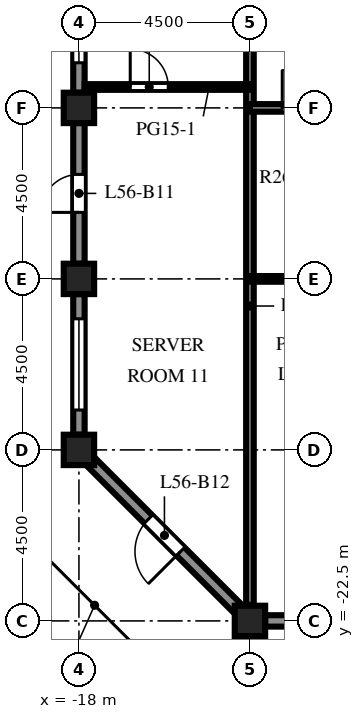
"""IFC4 building model, lengths in metres.
Left out: names, types, materials, properties, quantities, classifications, styles, units other than length and angle.
Written with IfcOpenShell. Run it as: python <this file> out.ifc"""

import sys

from ifc_helpers import new_model, si_unit, direction, frame, frame_2d, origin, origin_2d, place, context, subcontext, project, spatial, rectangle, extrude, element, fill, save


model = new_model("IFC4")
c1 = context("Model", 3, precision=1e-05, world=origin(), true_north=direction((0.0, 1.0)))
c2 = subcontext(c1, "Body", "Model", "MODEL_VIEW")
j1 = project(units=[si_unit("LENGTHUNIT", "METRE"), si_unit("PLANEANGLEUNIT", "RADIAN")], contexts=[c1])
p1 = place(None, origin())
s1 = spatial("IfcSite", under=j1, at=p1, CompositionType="ELEMENT")
p2 = place(p1, origin())
s2 = spatial("IfcBuilding", under=s1, at=p2, CompositionType="ELEMENT")
p3 = place(p2, frame((0.0, 0.0, 248.0)))
s3 = spatial("IfcBuildingStorey", under=s2, at=p3, CompositionType="ELEMENT", Elevation=248.0)
for number, where, z_axis, x_axis in (
    (1, (-18.0, -18.0, 0.0), (0.0, 0.0, 1.0), (1.0, 0.0, 0.0)),
    (2, (-18.0, -13.5, 0.0), (0.0, 0.0, 1.0), (1.0, 0.0, 0.0)),
    (3, (-18.0, -9.0, 0.0), (0.0, 0.0, 1.0), (1.0, 0.0, 0.0)),
    (4, (-13.5, -22.5, 0.0), (0.0, 0.0, 1.0), (1.0, 0.0, 0.0)),
):
    element("IfcColumn", number, at=place(p3, frame(where, z_axis=z_axis, x_axis=x_axis)), inside=s3, PredefinedType="COLUMN", context=c2, shape_type="SweptSolid", body=[
        extrude(rectangle(XDim=0.8, YDim=0.8, at=origin_2d()), origin(), (0.0, 0.0, 1.0), 4.1),
    ])
p4 = place(p3, frame((-9.4, -22.5, 0.0), z_axis=(0.0, 0.0, 1.0), x_axis=(-1.0, 0.0, 0.0)))
e5 = element("IfcWall", 5, at=p4, inside=s3, PredefinedType="SOLIDWALL", context=c2, shape_type="SweptSolid", body=[
    extrude(rectangle(XDim=3.7, YDim=0.3, at=frame_2d((1.85, 0.0))), origin(), (0.0, 0.0, 1.0), 2.85),
])
p5 = place(p4, frame((0.65, 0.0, 0.8)))
e6 = element("IfcOpeningElement", 6, at=p5, cuts=e5, PredefinedType="OPENING", context=c2, shape_type="SweptSolid", body=[
    extrude(rectangle(XDim=2.4, YDim=1.7, at=frame_2d((1.2, 0.85))), frame((0.0, 0.16, 0.0), z_axis=(0.0, -1.0, 0.0), x_axis=(1.0, 0.0, 0.0)), (0.0, 0.0, 1.0), 0.32),
])
p6 = place(p3, frame((-18.0, -8.6, 0.0), z_axis=(0.0, 0.0, 1.0), x_axis=(0.0, 1.0, 0.0)))
e7 = element("IfcWall", 7, at=p6, inside=s3, PredefinedType="SOLIDWALL", context=c2, shape_type="SweptSolid", body=[
    extrude(rectangle(XDim=3.7, YDim=0.3, at=frame_2d((1.85, 0.0))), origin(), (0.0, 0.0, 1.0), 2.85),
])
p7 = place(p6, frame((0.788, 0.0, 0.8)))
e8 = element("IfcOpeningElement", 8, at=p7, cuts=e7, PredefinedType="OPENING", context=c2, shape_type="SweptSolid", body=[
    extrude(rectangle(XDim=2.4, YDim=1.7, at=frame_2d((1.2, 0.85))), frame((0.0, 0.16, 0.0), z_axis=(0.0, -1.0, 0.0), x_axis=(1.0, 0.0, 0.0)), (0.0, 0.0, 1.0), 0.32),
])
p8 = place(p3, frame((-18.0, -13.1, 0.0), z_axis=(0.0, 0.0, 1.0), x_axis=(0.0, 1.0, 0.0)))
e9 = element("IfcWall", 9, at=p8, inside=s3, PredefinedType="SOLIDWALL", context=c2, shape_type="SweptSolid", body=[
    extrude(rectangle(XDim=3.7, YDim=0.3, at=frame_2d((1.85, 0.0))), origin(), (0.0, 0.0, 1.0), 2.85),
])
p9 = place(p8, frame((1.35, 0.0, 0.0)))
e10 = element("IfcOpeningElement", 10, at=p9, cuts=e9, PredefinedType="OPENING", context=c2, shape_type="SweptSolid", body=[
    extrude(rectangle(XDim=1.0, YDim=2.2, at=frame_2d((0.5, 1.1))), frame((0.0, 0.16, 0.0), z_axis=(0.0, -1.0, 0.0), x_axis=(1.0, 0.0, 0.0)), (0.0, 0.0, 1.0), 0.32),
])
p10 = place(p3, frame((-18.0, -17.6, 0.0), z_axis=(0.0, 0.0, 1.0), x_axis=(0.0, 1.0, 0.0)))
e11 = element("IfcWall", 11, at=p10, inside=s3, PredefinedType="SOLIDWALL", context=c2, shape_type="SweptSolid", body=[
    extrude(rectangle(XDim=3.7, YDim=0.3, at=frame_2d((1.85, 0.0))), origin(), (0.0, 0.0, 1.0), 2.85),
])
p11 = place(p10, frame((0.65, 0.0, 0.8)))
e12 = element("IfcOpeningElement", 12, at=p11, cuts=e11, PredefinedType="OPENING", context=c2, shape_type="SweptSolid", body=[
    extrude(rectangle(XDim=2.4, YDim=1.7, at=frame_2d((1.2, 0.85))), frame((0.0, 0.16, 0.0), z_axis=(0.0, -1.0, 0.0), x_axis=(1.0, 0.0, 0.0)), (0.0, 0.0, 1.0), 0.32),
])
p12 = place(p3, frame((-13.794, -22.206, 0.0), z_axis=(0.0, 0.0, 1.0), x_axis=(-0.707106781187, 0.707106781187, 0.0)))
e13 = element("IfcWall", 13, at=p12, inside=s3, PredefinedType="SOLIDWALL", context=c2, shape_type="SweptSolid", body=[
    extrude(rectangle(XDim=5.532, YDim=0.3, at=frame_2d((2.766, 0.0))), origin(), (0.0, 0.0, 1.0), 2.85),
])
p13 = place(p12, frame((2.166, 0.0, 0.0)))
e14 = element("IfcOpeningElement", 14, at=p13, cuts=e13, PredefinedType="OPENING", context=c2, shape_type="SweptSolid", body=[
    extrude(rectangle(XDim=1.2, YDim=2.2, at=frame_2d((0.6, 1.1))), frame((0.0, 0.16, 0.0), z_axis=(0.0, -1.0, 0.0), x_axis=(1.0, 0.0, 0.0)), (0.0, 0.0, 1.0), 0.32),
])
p14 = place(p3, frame((-13.5, -22.077, 0.0), z_axis=(0.0, 0.0, 1.0), x_axis=(0.0, 1.0, 0.0)))
e15 = element("IfcWall", 15, at=p14, inside=s3, PredefinedType="PARTITIONING", context=c2, shape_type="SweptSolid", body=[
    extrude(rectangle(XDim=25.327, YDim=0.2, at=frame_2d((12.664, 0.0))), origin(), (0.0, 0.0, 1.0), 3.65),
])
p15 = place(p14, frame((15.727, 0.0, 0.0)))
e16 = element("IfcOpeningElement", 16, at=p15, cuts=e15, PredefinedType="OPENING", context=c2, shape_type="SweptSolid", body=[
    extrude(rectangle(XDim=1.0, YDim=2.1, at=frame_2d((0.5, 1.05))), frame((0.0, 0.11, 0.0), z_axis=(0.0, -1.0, 0.0), x_axis=(1.0, 0.0, 0.0)), (0.0, 0.0, 1.0), 0.22),
])
p16 = place(p3, frame((21.0, -13.5, 0.0), z_axis=(0.0, 0.0, 1.0), x_axis=(-1.0, 0.0, 0.0)))
e17 = element("IfcWall", 17, at=p16, inside=s3, PredefinedType="PARTITIONING", context=c2, shape_type="SweptSolid", body=[
    extrude(rectangle(XDim=34.5, YDim=0.15, at=frame_2d((17.25, 0.0))), origin(), (0.0, 0.0, 1.0), 3.65),
])
p17 = place(p16, frame((31.65, 0.0, 0.0)))
e18 = element("IfcOpeningElement", 18, at=p17, cuts=e17, PredefinedType="OPENING", context=c2, shape_type="SweptSolid", body=[
    extrude(rectangle(XDim=1.0, YDim=2.1, at=frame_2d((0.5, 1.05))), frame((0.0, 0.085, 0.0), z_axis=(0.0, -1.0, 0.0), x_axis=(1.0, 0.0, 0.0)), (0.0, 0.0, 1.0), 0.17),
])
p18 = place(p16, frame((22.15, 0.0, 0.0)))
e19 = element("IfcOpeningElement", 19, at=p18, cuts=e17, PredefinedType="OPENING", context=c2, shape_type="SweptSolid", body=[
    extrude(rectangle(XDim=1.0, YDim=2.1, at=frame_2d((0.5, 1.05))), frame((0.0, 0.085, 0.0), z_axis=(0.0, -1.0, 0.0), x_axis=(1.0, 0.0, 0.0)), (0.0, 0.0, 1.0), 0.17),
])
p19 = place(p16, frame((13.15, 0.0, 0.0)))
e20 = element("IfcOpeningElement", 20, at=p19, cuts=e17, PredefinedType="OPENING", context=c2, shape_type="SweptSolid", body=[
    extrude(rectangle(XDim=1.0, YDim=2.1, at=frame_2d((0.5, 1.05))), frame((0.0, 0.085, 0.0), z_axis=(0.0, -1.0, 0.0), x_axis=(1.0, 0.0, 0.0)), (0.0, 0.0, 1.0), 0.17),
])
p20 = place(p16, frame((6.15, 0.0, 0.0)))
e21 = element("IfcOpeningElement", 21, at=p20, cuts=e17, PredefinedType="OPENING", context=c2, shape_type="SweptSolid", body=[
    extrude(rectangle(XDim=1.0, YDim=2.1, at=frame_2d((0.5, 1.05))), frame((0.0, 0.085, 0.0), z_axis=(0.0, -1.0, 0.0), x_axis=(1.0, 0.0, 0.0)), (0.0, 0.0, 1.0), 0.17),
])
p21 = place(p3, frame((-10.5, -9.0, 0.0), z_axis=(0.0, 0.0, 1.0), x_axis=(-1.0, 0.0, 0.0)))
e22 = element("IfcWall", 22, at=p21, inside=s3, PredefinedType="PARTITIONING", context=c2, shape_type="SweptSolid", body=[
    extrude(rectangle(XDim=3.0, YDim=0.2, at=frame_2d((1.5, 0.0))), origin(), (0.0, 0.0, 1.0), 3.65),
])
p22 = place(p21, frame((1.15, 0.0, 0.0)))
e23 = element("IfcOpeningElement", 23, at=p22, cuts=e22, PredefinedType="OPENING", context=c2, shape_type="SweptSolid", body=[
    extrude(rectangle(XDim=1.0, YDim=2.1, at=frame_2d((0.5, 1.05))), frame((0.0, 0.11, 0.0), z_axis=(0.0, -1.0, 0.0), x_axis=(1.0, 0.0, 0.0)), (0.0, 0.0, 1.0), 0.22),
])
p23 = place(p3, frame((-13.5, -8.45, 0.0), z_axis=(0.0, 0.0, 1.0), x_axis=(-1.0, 0.0, 0.0)))
e24 = element("IfcWall", 24, at=p23, inside=s3, PredefinedType="PARTITIONING", context=c2, shape_type="SweptSolid", body=[
    extrude(rectangle(XDim=4.35, YDim=0.15, at=frame_2d((2.175, 0.0))), origin(), (0.0, 0.0, 1.0), 3.65),
])
p24 = place(p23, frame((2.15, 0.0, 0.0)))
e25 = element("IfcOpeningElement", 25, at=p24, cuts=e24, PredefinedType="OPENING", context=c2, shape_type="SweptSolid", body=[
    extrude(rectangle(XDim=1.0, YDim=2.1, at=frame_2d((0.5, 1.05))), frame((0.0, 0.085, 0.0), z_axis=(0.0, -1.0, 0.0), x_axis=(1.0, 0.0, 0.0)), (0.0, 0.0, 1.0), 0.17),
])
p25 = place(p7, origin())
e26 = element("IfcWindow", 26, at=p25, inside=s3, PartitioningType="SINGLE_PANEL", PredefinedType="WINDOW", context=c2, shape_type="SweptSolid", body=[
    extrude(rectangle(XDim=2.4, YDim=1.7, at=frame_2d((1.2, 0.85))), frame((0.0, 0.03, 0.0), z_axis=(0.0, -1.0, 0.0), x_axis=(1.0, 0.0, 0.0)), (0.0, 0.0, 1.0), 0.06),
])
fill(e8, e26)
p26 = place(p9, origin())
e27 = element("IfcDoor", 27, at=p26, inside=s3, OperationType="SINGLE_SWING_LEFT", PredefinedType="DOOR", context=c2, shape_type="SweptSolid", body=[
    extrude(rectangle(XDim=1.0, YDim=2.2, at=frame_2d((0.5, 1.1))), frame((0.0, 0.025, 0.0), z_axis=(0.0, -1.0, 0.0), x_axis=(1.0, 0.0, 0.0)), (0.0, 0.0, 1.0), 0.05),
])
fill(e10, e27)
p27 = place(p11, origin())
e28 = element("IfcWindow", 28, at=p27, inside=s3, PartitioningType="SINGLE_PANEL", PredefinedType="WINDOW", context=c2, shape_type="SweptSolid", body=[
    extrude(rectangle(XDim=2.4, YDim=1.7, at=frame_2d((1.2, 0.85))), frame((0.0, 0.03, 0.0), z_axis=(0.0, -1.0, 0.0), x_axis=(1.0, 0.0, 0.0)), (0.0, 0.0, 1.0), 0.06),
])
fill(e12, e28)
p28 = place(p13, origin())
e29 = element("IfcDoor", 29, at=p28, inside=s3, OperationType="SINGLE_SWING_LEFT", PredefinedType="DOOR", context=c2, shape_type="SweptSolid", body=[
    extrude(rectangle(XDim=1.2, YDim=2.2, at=frame_2d((0.6, 1.1))), frame((0.0, 0.025, 0.0), z_axis=(0.0, -1.0, 0.0), x_axis=(1.0, 0.0, 0.0)), (0.0, 0.0, 1.0), 0.05),
])
fill(e14, e29)
p29 = place(p22, origin())
e30 = element("IfcDoor", 30, at=p29, inside=s3, OperationType="SINGLE_SWING_RIGHT", PredefinedType="DOOR", context=c2, shape_type="SweptSolid", body=[
    extrude(rectangle(XDim=1.0, YDim=2.1, at=frame_2d((0.5, 1.05))), frame((0.0, 0.025, 0.0), z_axis=(0.0, -1.0, 0.0), x_axis=(1.0, 0.0, 0.0)), (0.0, 0.0, 1.0), 0.05),
])
fill(e23, e30)
p30 = place(p24, origin())
e31 = element("IfcDoor", 31, at=p30, inside=s3, OperationType="SINGLE_SWING_RIGHT", PredefinedType="DOOR", context=c2, shape_type="SweptSolid", body=[
    extrude(rectangle(XDim=1.0, YDim=2.1, at=frame_2d((0.5, 1.05))), frame((0.0, 0.025, 0.0), z_axis=(0.0, -1.0, 0.0), x_axis=(1.0, 0.0, 0.0)), (0.0, 0.0, 1.0), 0.05),
])
fill(e25, e31)
save(model, sys.argv[1])
